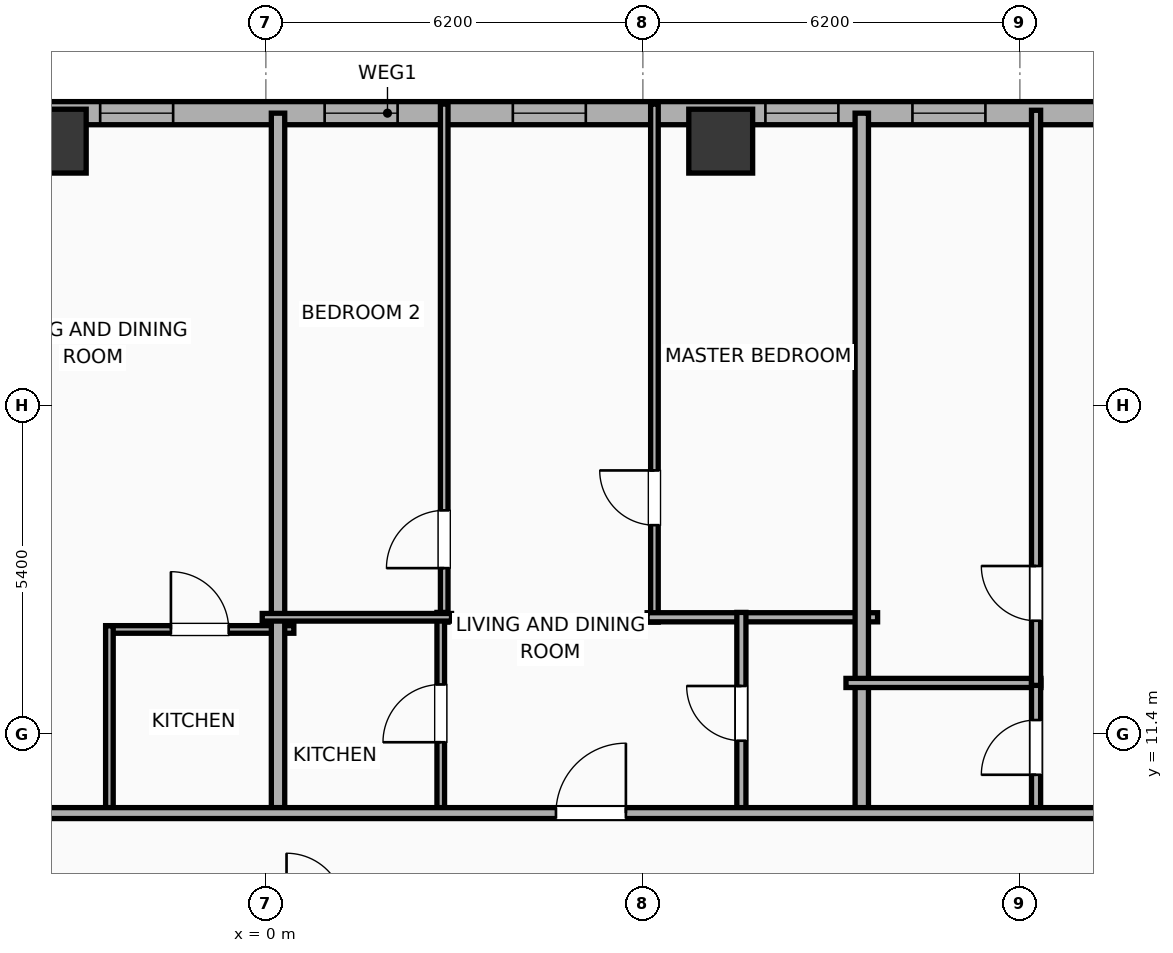
"""IFC4 building model, lengths in metres.
Left out: names, types, materials, properties, quantities, classifications, styles, units other than length and angle.
Written with IfcOpenShell. Run it as: python <this file> out.ifc"""

import sys

from ifc_helpers import new_model, si_unit, direction, frame, frame_2d, origin, origin_2d, place, context, subcontext, project, spatial, rectangle, hollow_rectangle, extrude, element, fill, save


model = new_model("IFC4")
c1 = context("Model", 3, precision=1e-05, world=origin(), true_north=direction((0.0, 1.0)))
c2 = subcontext(c1, "Body", "Model", "MODEL_VIEW")
j1 = project(units=[si_unit("LENGTHUNIT", "METRE"), si_unit("PLANEANGLEUNIT", "RADIAN")], contexts=[c1])
p1 = place(None, origin())
s1 = spatial("IfcSite", under=j1, at=p1, CompositionType="ELEMENT")
p2 = place(p1, origin())
s2 = spatial("IfcBuilding", under=s1, at=p2, CompositionType="ELEMENT")
p3 = place(p2, frame((0.0, 0.0, 97.5)))
s3 = spatial("IfcBuildingStorey", under=s2, at=p3, CompositionType="ELEMENT", Elevation=97.5)
for number, where, z_axis, x_axis in (
    (1, (7.48, 21.15, 0.0), (0.0, 0.0, 1.0), (1.0, 0.0, 0.0)),
    (2, (-3.48, 21.15, 0.0), (0.0, 0.0, 1.0), (1.0, 0.0, 0.0)),
):
    element("IfcColumn", number, at=place(p3, frame(where, z_axis=z_axis, x_axis=x_axis)), inside=s3, PredefinedType="COLUMN", context=c2, shape_type="SweptSolid", body=[
        extrude(hollow_rectangle(XDim=1.05, YDim=1.05, WallThickness=0.036, at=origin_2d()), origin(), (0.0, 0.0, 1.0), 3.9),
    ])
p4 = place(p3, frame((-25.381, 21.61, 0.0), z_axis=(0.0, 0.0, 1.0), x_axis=(1.0, 0.0, 0.0)))
e3 = element("IfcWall", 3, at=p4, inside=s3, PredefinedType="ELEMENTEDWALL", context=c2, shape_type="SweptSolid", body=[
    extrude(rectangle(XDim=54.763, YDim=0.38, at=frame_2d((27.381, 0.0))), origin(), (0.0, 0.0, 1.0), 3.65),
])
p5 = place(p4, frame((45.067, 0.0, 0.75)))
e4 = element("IfcOpeningElement", 4, at=p5, cuts=e3, PredefinedType="OPENING", context=c2, shape_type="SweptSolid", body=[
    extrude(rectangle(XDim=2.4, YDim=2.1, at=frame_2d((1.2, 1.05))), frame((0.0, 0.2, 0.0), z_axis=(0.0, -1.0, 0.0), x_axis=(1.0, 0.0, 0.0)), (0.0, 0.0, 1.0), 0.4),
])
p6 = place(p4, frame((4.076, 0.0, 0.75)))
e5 = element("IfcOpeningElement", 5, at=p6, cuts=e3, PredefinedType="OPENING", context=c2, shape_type="SweptSolid", body=[
    extrude(rectangle(XDim=1.2, YDim=2.05, at=frame_2d((0.6, 1.025))), frame((0.0, 0.2, 0.0), z_axis=(0.0, -1.0, 0.0), x_axis=(1.0, 0.0, 0.0)), (0.0, 0.0, 1.0), 0.4),
])
p7 = place(p4, frame((9.395, 0.0, 0.75)))
e6 = element("IfcOpeningElement", 6, at=p7, cuts=e3, PredefinedType="OPENING", context=c2, shape_type="SweptSolid", body=[
    extrude(rectangle(XDim=0.85, YDim=2.05, at=frame_2d((0.425, 1.025))), frame((0.0, 0.2, 0.0), z_axis=(0.0, -1.0, 0.0), x_axis=(1.0, 0.0, 0.0)), (0.0, 0.0, 1.0), 0.4),
])
p8 = place(p4, frame((7.205, 0.0, 0.75)))
e7 = element("IfcOpeningElement", 7, at=p8, cuts=e3, PredefinedType="OPENING", context=c2, shape_type="SweptSolid", body=[
    extrude(rectangle(XDim=1.2, YDim=2.05, at=frame_2d((0.6, 1.025))), frame((0.0, 0.2, 0.0), z_axis=(0.0, -1.0, 0.0), x_axis=(1.0, 0.0, 0.0)), (0.0, 0.0, 1.0), 0.4),
])
p9 = place(p4, frame((13.676, 0.0, 0.75)))
e8 = element("IfcOpeningElement", 8, at=p9, cuts=e3, PredefinedType="OPENING", context=c2, shape_type="SweptSolid", body=[
    extrude(rectangle(XDim=1.2, YDim=2.05, at=frame_2d((0.6, 1.025))), frame((0.0, 0.2, 0.0), z_axis=(0.0, -1.0, 0.0), x_axis=(1.0, 0.0, 0.0)), (0.0, 0.0, 1.0), 0.4),
])
p10 = place(p4, frame((17.136, 0.0, 0.75)))
e9 = element("IfcOpeningElement", 9, at=p10, cuts=e3, PredefinedType="OPENING", context=c2, shape_type="SweptSolid", body=[
    extrude(rectangle(XDim=1.2, YDim=2.05, at=frame_2d((0.6, 1.025))), frame((0.0, 0.2, 0.0), z_axis=(0.0, -1.0, 0.0), x_axis=(1.0, 0.0, 0.0)), (0.0, 0.0, 1.0), 0.4),
])
p11 = place(p4, frame((22.656, 0.0, 0.75)))
e10 = element("IfcOpeningElement", 10, at=p11, cuts=e3, PredefinedType="OPENING", context=c2, shape_type="SweptSolid", body=[
    extrude(rectangle(XDim=1.2, YDim=2.05, at=frame_2d((0.6, 1.025))), frame((0.0, 0.2, 0.0), z_axis=(0.0, -1.0, 0.0), x_axis=(1.0, 0.0, 0.0)), (0.0, 0.0, 1.0), 0.4),
])
p12 = place(p4, frame((29.443, 0.0, 0.75)))
e11 = element("IfcOpeningElement", 11, at=p12, cuts=e3, PredefinedType="OPENING", context=c2, shape_type="SweptSolid", body=[
    extrude(rectangle(XDim=1.2, YDim=2.05, at=frame_2d((0.6, 1.025))), frame((0.0, 0.2, 0.0), z_axis=(0.0, -1.0, 0.0), x_axis=(1.0, 0.0, 0.0)), (0.0, 0.0, 1.0), 0.4),
])
p13 = place(p4, frame((26.348, 0.0, 0.75)))
e12 = element("IfcOpeningElement", 12, at=p13, cuts=e3, PredefinedType="OPENING", context=c2, shape_type="SweptSolid", body=[
    extrude(rectangle(XDim=1.2, YDim=2.05, at=frame_2d((0.6, 1.025))), frame((0.0, 0.2, 0.0), z_axis=(0.0, -1.0, 0.0), x_axis=(1.0, 0.0, 0.0)), (0.0, 0.0, 1.0), 0.4),
])
p14 = place(p4, frame((33.596, 0.0, 0.75)))
e13 = element("IfcOpeningElement", 13, at=p14, cuts=e3, PredefinedType="OPENING", context=c2, shape_type="SweptSolid", body=[
    extrude(rectangle(XDim=1.2, YDim=2.05, at=frame_2d((0.6, 1.025))), frame((0.0, 0.2, 0.0), z_axis=(0.0, -1.0, 0.0), x_axis=(1.0, 0.0, 0.0)), (0.0, 0.0, 1.0), 0.4),
])
p15 = place(p4, frame((36.014, 0.0, 0.75)))
e14 = element("IfcOpeningElement", 14, at=p15, cuts=e3, PredefinedType="OPENING", context=c2, shape_type="SweptSolid", body=[
    extrude(rectangle(XDim=1.2, YDim=2.05, at=frame_2d((0.6, 1.025))), frame((0.0, 0.2, 0.0), z_axis=(0.0, -1.0, 0.0), x_axis=(1.0, 0.0, 0.0)), (0.0, 0.0, 1.0), 0.4),
])
p16 = place(p4, frame((40.814, 0.0, 0.75)))
e15 = element("IfcOpeningElement", 15, at=p16, cuts=e3, PredefinedType="OPENING", context=c2, shape_type="SweptSolid", body=[
    extrude(rectangle(XDim=1.2, YDim=2.05, at=frame_2d((0.6, 1.025))), frame((0.0, 0.2, 0.0), z_axis=(0.0, -1.0, 0.0), x_axis=(1.0, 0.0, 0.0)), (0.0, 0.0, 1.0), 0.4),
])
p17 = place(p4, frame((49.385, 0.0, 0.75)))
e16 = element("IfcOpeningElement", 16, at=p17, cuts=e3, PredefinedType="OPENING", context=c2, shape_type="SweptSolid", body=[
    extrude(rectangle(XDim=1.2, YDim=2.05, at=frame_2d((0.6, 1.025))), frame((0.0, 0.2, 0.0), z_axis=(0.0, -1.0, 0.0), x_axis=(1.0, 0.0, 0.0)), (0.0, 0.0, 1.0), 0.4),
])
p18 = place(p4, frame((52.181, 0.0, 0.75)))
e17 = element("IfcOpeningElement", 17, at=p18, cuts=e3, PredefinedType="OPENING", context=c2, shape_type="SweptSolid", body=[
    extrude(rectangle(XDim=1.2, YDim=2.05, at=frame_2d((0.6, 1.025))), frame((0.0, 0.2, 0.0), z_axis=(0.0, -1.0, 0.0), x_axis=(1.0, 0.0, 0.0)), (0.0, 0.0, 1.0), 0.4),
])
p19 = place(p3, frame((-2.633, 13.12, 0.0), z_axis=(0.0, 0.0, 1.0), x_axis=(1.0, 0.0, 0.0)))
e18 = element("IfcWall", 18, at=p19, inside=s3, PredefinedType="PARTITIONING", context=c2, shape_type="SweptSolid", body=[
    extrude(rectangle(XDim=3.093, YDim=0.125, at=frame_2d((1.546, 0.0))), origin(), (0.0, 0.0, 1.0), 3.65),
])
p20 = place(p19, frame((1.072, 0.0, 0.0)))
e19 = element("IfcOpeningElement", 19, at=p20, cuts=e18, PredefinedType="OPENING", context=c2, shape_type="SweptSolid", body=[
    extrude(rectangle(XDim=0.95, YDim=2.05, at=frame_2d((0.475, 1.025))), frame((0.0, 0.073, 0.0), z_axis=(0.0, -1.0, 0.0), x_axis=(1.0, 0.0, 0.0)), (0.0, 0.0, 1.0), 0.145),
])
p21 = place(p3, frame((-2.573, 10.08, 0.0), z_axis=(0.0, 0.0, 1.0), x_axis=(0.0, 1.0, 0.0)))
e20 = element("IfcWall", 20, at=p21, inside=s3, PredefinedType="PARTITIONING", context=c2, shape_type="SweptSolid", body=[
    extrude(rectangle(XDim=3.1, YDim=0.125, at=frame_2d((1.55, 0.0))), origin(), (0.0, 0.0, 1.0), 3.65),
])
p22 = place(p3, frame((0.2, 10.02, 0.0), z_axis=(0.0, 0.0, 1.0), x_axis=(0.0, 1.0, 0.0)))
e21 = element("IfcWall", 21, at=p22, inside=s3, PredefinedType="PARTITIONING", context=c2, shape_type="SweptSolid", body=[
    extrude(rectangle(XDim=11.59, YDim=0.22, at=frame_2d((5.795, 0.0))), origin(), (0.0, 0.0, 1.0), 3.65),
])
p23 = place(p3, frame((2.933, 13.24, 0.0), z_axis=(0.0, 0.0, 1.0), x_axis=(0.0, 1.0, 0.0)))
e22 = element("IfcWall", 22, at=p23, inside=s3, PredefinedType="PARTITIONING", context=c2, shape_type="SweptSolid", body=[
    extrude(rectangle(XDim=8.52, YDim=0.125, at=frame_2d((4.26, 0.0))), origin(), (0.0, 0.0, 1.0), 3.65),
])
p24 = place(p23, frame((0.888, 0.0, 0.0)))
e23 = element("IfcOpeningElement", 23, at=p24, cuts=e22, PredefinedType="OPENING", context=c2, shape_type="SweptSolid", body=[
    extrude(rectangle(XDim=0.95, YDim=2.05, at=frame_2d((0.475, 1.025))), frame((0.0, 0.073, 0.0), z_axis=(0.0, -1.0, 0.0), x_axis=(1.0, 0.0, 0.0)), (0.0, 0.0, 1.0), 0.145),
])
p25 = place(p3, frame((6.39, 13.24, 0.0), z_axis=(0.0, 0.0, 1.0), x_axis=(0.0, 1.0, 0.0)))
e24 = element("IfcWall", 24, at=p25, inside=s3, PredefinedType="PARTITIONING", context=c2, shape_type="SweptSolid", body=[
    extrude(rectangle(XDim=8.52, YDim=0.125, at=frame_2d((4.26, 0.0))), origin(), (0.0, 0.0, 1.0), 3.04),
])
p26 = place(p25, frame((1.595, 0.0, 0.0)))
e25 = element("IfcOpeningElement", 25, at=p26, cuts=e24, PredefinedType="OPENING", context=c2, shape_type="SweptSolid", body=[
    extrude(rectangle(XDim=0.9, YDim=2.05, at=frame_2d((0.45, 1.025))), frame((0.0, 0.073, 0.0), z_axis=(0.0, -1.0, 0.0), x_axis=(1.0, 0.0, 0.0)), (0.0, 0.0, 1.0), 0.145),
])
p27 = place(p3, frame((6.27, 13.32, 0.0), z_axis=(0.0, 0.0, 1.0), x_axis=(1.0, 0.0, 0.0)))
e26 = element("IfcWall", 26, at=p27, inside=s3, PredefinedType="PLUMBINGWALL", context=c2, shape_type="SweptSolid", body=[
    extrude(rectangle(XDim=3.79, YDim=0.15, at=frame_2d((1.895, 0.0))), origin(), (0.0, 0.0, 1.0), 3.65),
])
p28 = place(p3, frame((2.876, 10.08, 0.0), z_axis=(0.0, 0.0, 1.0), x_axis=(0.0, 1.0, 0.0)))
e27 = element("IfcWall", 27, at=p28, inside=s3, PredefinedType="PARTITIONING", context=c2, shape_type="SweptSolid", body=[
    extrude(rectangle(XDim=3.32, YDim=0.125, at=frame_2d((1.66, 0.0))), origin(), (0.0, 0.0, 1.0), 3.65),
])
p29 = place(p28, frame((1.185, 0.0, 0.0)))
e28 = element("IfcOpeningElement", 28, at=p29, cuts=e27, PredefinedType="OPENING", context=c2, shape_type="SweptSolid", body=[
    extrude(rectangle(XDim=0.95, YDim=2.05, at=frame_2d((0.475, 1.025))), frame((0.0, 0.073, 0.0), z_axis=(0.0, -1.0, 0.0), x_axis=(1.0, 0.0, 0.0)), (0.0, 0.0, 1.0), 0.145),
])
p30 = place(p3, frame((-0.06, 13.32, 0.0), z_axis=(0.0, 0.0, 1.0), x_axis=(1.0, 0.0, 0.0)))
e29 = element("IfcWall", 29, at=p30, inside=s3, PredefinedType="PARTITIONING", context=c2, shape_type="SweptSolid", body=[
    extrude(rectangle(XDim=3.113, YDim=0.125, at=frame_2d((1.557, 0.0))), origin(), (0.0, 0.0, 1.0), 3.65),
])
p31 = place(p3, frame((7.82, 10.08, 0.0), z_axis=(0.0, 0.0, 1.0), x_axis=(0.0, 1.0, 0.0)))
e30 = element("IfcWall", 30, at=p31, inside=s3, PredefinedType="PLUMBINGWALL", context=c2, shape_type="SweptSolid", body=[
    extrude(rectangle(XDim=3.32, YDim=0.15, at=frame_2d((1.66, 0.0))), origin(), (0.0, 0.0, 1.0), 3.65),
])
p32 = place(p31, frame((1.21, 0.0, 0.0)))
e31 = element("IfcOpeningElement", 31, at=p32, cuts=e30, PredefinedType="OPENING", context=c2, shape_type="SweptSolid", body=[
    extrude(rectangle(XDim=0.9, YDim=2.05, at=frame_2d((0.45, 1.025))), frame((0.0, 0.085, 0.0), z_axis=(0.0, -1.0, 0.0), x_axis=(1.0, 0.0, 0.0)), (0.0, 0.0, 1.0), 0.17),
])
p33 = place(p3, frame((9.8, 10.02, 0.0), z_axis=(0.0, 0.0, 1.0), x_axis=(0.0, 1.0, 0.0)))
e32 = element("IfcWall", 32, at=p33, inside=s3, PredefinedType="PARTITIONING", context=c2, shape_type="SweptSolid", body=[
    extrude(rectangle(XDim=11.59, YDim=0.22, at=frame_2d((5.795, 0.0))), origin(), (0.0, 0.0, 1.0), 3.65),
])
p34 = place(p3, frame((9.54, 12.24, 0.0), z_axis=(0.0, 0.0, 1.0), x_axis=(1.0, 0.0, 0.0)))
e33 = element("IfcWall", 33, at=p34, inside=s3, PredefinedType="PLUMBINGWALL", context=c2, shape_type="SweptSolid", body=[
    extrude(rectangle(XDim=3.206, YDim=0.15, at=frame_2d((1.603, 0.0))), origin(), (0.0, 0.0, 1.0), 3.65),
])
p35 = place(p3, frame((12.666, 10.08, 0.0), z_axis=(0.0, 0.0, 1.0), x_axis=(0.0, 1.0, 0.0)))
e34 = element("IfcWall", 34, at=p35, inside=s3, PredefinedType="PLUMBINGWALL", context=c2, shape_type="SweptSolid", body=[
    extrude(rectangle(XDim=2.2, YDim=0.15, at=frame_2d((1.1, 0.0))), origin(), (0.0, 0.0, 1.0), 3.65),
])
p36 = place(p35, frame((0.65, 0.0, 0.0)))
e35 = element("IfcOpeningElement", 35, at=p36, cuts=e34, PredefinedType="OPENING", context=c2, shape_type="SweptSolid", body=[
    extrude(rectangle(XDim=0.9, YDim=2.05, at=frame_2d((0.45, 1.025))), frame((0.0, 0.085, 0.0), z_axis=(0.0, -1.0, 0.0), x_axis=(1.0, 0.0, 0.0)), (0.0, 0.0, 1.0), 0.17),
])
p37 = place(p3, frame((12.666, 12.2, 0.0), z_axis=(0.0, 0.0, 1.0), x_axis=(0.0, 1.0, 0.0)))
e36 = element("IfcWall", 36, at=p37, inside=s3, PredefinedType="PLUMBINGWALL", context=c2, shape_type="SweptSolid", body=[
    extrude(rectangle(XDim=9.458, YDim=0.15, at=frame_2d((4.729, 0.0))), origin(), (0.0, 0.0, 1.0), 3.65),
])
p38 = place(p37, frame((1.063, 0.0, 0.0)))
e37 = element("IfcOpeningElement", 37, at=p38, cuts=e36, PredefinedType="OPENING", context=c2, shape_type="SweptSolid", body=[
    extrude(rectangle(XDim=0.9, YDim=2.05, at=frame_2d((0.45, 1.025))), frame((0.0, 0.085, 0.0), z_axis=(0.0, -1.0, 0.0), x_axis=(1.0, 0.0, 0.0)), (0.0, 0.0, 1.0), 0.17),
])
p39 = place(p3, frame((-29.21, 10.1, 0.0), z_axis=(0.0, 0.0, 1.0), x_axis=(1.0, 0.0, 0.0)))
e38 = element("IfcWall", 38, at=p39, inside=s3, PredefinedType="PARTITIONING", context=c2, shape_type="SweptSolid", body=[
    extrude(rectangle(XDim=62.42, YDim=0.18, at=frame_2d((31.21, 0.0))), origin(), (0.0, 0.0, 1.0), 3.65),
])
p40 = place(p39, frame((4.906, 0.0, 0.0)))
e39 = element("IfcOpeningElement", 39, at=p40, cuts=e38, PredefinedType="OPENING", context=c2, shape_type="SweptSolid", body=[
    extrude(rectangle(XDim=1.15, YDim=2.05, at=frame_2d((0.575, 1.025))), frame((0.0, 0.1, 0.0), z_axis=(0.0, -1.0, 0.0), x_axis=(1.0, 0.0, 0.0)), (0.0, 0.0, 1.0), 0.2),
])
p41 = place(p39, frame((14.812, 0.0, 0.0)))
e40 = element("IfcOpeningElement", 40, at=p41, cuts=e38, PredefinedType="OPENING", context=c2, shape_type="SweptSolid", body=[
    extrude(rectangle(XDim=1.15, YDim=2.05, at=frame_2d((0.575, 1.025))), frame((0.0, 0.1, 0.0), z_axis=(0.0, -1.0, 0.0), x_axis=(1.0, 0.0, 0.0)), (0.0, 0.0, 1.0), 0.2),
])
p42 = place(p39, frame((24.406, 0.0, 0.0)))
e41 = element("IfcOpeningElement", 41, at=p42, cuts=e38, PredefinedType="OPENING", context=c2, shape_type="SweptSolid", body=[
    extrude(rectangle(XDim=1.15, YDim=2.05, at=frame_2d((0.575, 1.025))), frame((0.0, 0.1, 0.0), z_axis=(0.0, -1.0, 0.0), x_axis=(1.0, 0.0, 0.0)), (0.0, 0.0, 1.0), 0.2),
])
p43 = place(p39, frame((33.981, 0.0, 0.0)))
e42 = element("IfcOpeningElement", 42, at=p43, cuts=e38, PredefinedType="OPENING", context=c2, shape_type="SweptSolid", body=[
    extrude(rectangle(XDim=1.15, YDim=2.05, at=frame_2d((0.575, 1.025))), frame((0.0, 0.1, 0.0), z_axis=(0.0, -1.0, 0.0), x_axis=(1.0, 0.0, 0.0)), (0.0, 0.0, 1.0), 0.2),
])
p44 = place(p39, frame((43.138, 0.0, 0.0)))
e43 = element("IfcOpeningElement", 43, at=p44, cuts=e38, PredefinedType="OPENING", context=c2, shape_type="SweptSolid", body=[
    extrude(rectangle(XDim=1.15, YDim=2.05, at=frame_2d((0.575, 1.025))), frame((0.0, 0.1, 0.0), z_axis=(0.0, -1.0, 0.0), x_axis=(1.0, 0.0, 0.0)), (0.0, 0.0, 1.0), 0.2),
])
p45 = place(p39, frame((51.777, 0.0, 0.0)))
e44 = element("IfcOpeningElement", 44, at=p45, cuts=e38, PredefinedType="OPENING", context=c2, shape_type="SweptSolid", body=[
    extrude(rectangle(XDim=0.9, YDim=2.05, at=frame_2d((0.45, 1.025))), frame((0.0, 0.1, 0.0), z_axis=(0.0, -1.0, 0.0), x_axis=(1.0, 0.0, 0.0)), (0.0, 0.0, 1.0), 0.2),
])
p46 = place(p39, frame((58.718, 0.0, 0.0)))
e45 = element("IfcOpeningElement", 45, at=p46, cuts=e38, PredefinedType="OPENING", context=c2, shape_type="SweptSolid", body=[
    extrude(rectangle(XDim=0.9, YDim=2.05, at=frame_2d((0.45, 1.025))), frame((0.0, 0.1, 0.0), z_axis=(0.0, -1.0, 0.0), x_axis=(1.0, 0.0, 0.0)), (0.0, 0.0, 1.0), 0.2),
])
p47 = place(p11, origin())
e46 = element("IfcWindow", 46, at=p47, inside=s3, PartitioningType="SINGLE_PANEL", PredefinedType="WINDOW", context=c2, shape_type="SweptSolid", body=[
    extrude(rectangle(XDim=1.2, YDim=2.05, at=frame_2d((0.6, 1.025))), frame((0.0, 0.03, 0.0), z_axis=(0.0, -1.0, 0.0), x_axis=(1.0, 0.0, 0.0)), (0.0, 0.0, 1.0), 0.06),
])
fill(e10, e46)
p48 = place(p12, origin())
e47 = element("IfcWindow", 47, at=p48, inside=s3, PartitioningType="SINGLE_PANEL", PredefinedType="WINDOW", context=c2, shape_type="SweptSolid", body=[
    extrude(rectangle(XDim=1.2, YDim=2.05, at=frame_2d((0.6, 1.025))), frame((0.0, 0.03, 0.0), z_axis=(0.0, -1.0, 0.0), x_axis=(1.0, 0.0, 0.0)), (0.0, 0.0, 1.0), 0.06),
])
fill(e11, e47)
p49 = place(p13, origin())
e48 = element("IfcWindow", 48, at=p49, inside=s3, PartitioningType="SINGLE_PANEL", PredefinedType="WINDOW", context=c2, shape_type="SweptSolid", body=[
    extrude(rectangle(XDim=1.2, YDim=2.05, at=frame_2d((0.6, 1.025))), frame((0.0, 0.03, 0.0), z_axis=(0.0, -1.0, 0.0), x_axis=(1.0, 0.0, 0.0)), (0.0, 0.0, 1.0), 0.06),
])
fill(e12, e48)
p50 = place(p14, origin())
e49 = element("IfcWindow", 49, at=p50, inside=s3, PartitioningType="SINGLE_PANEL", PredefinedType="WINDOW", context=c2, shape_type="SweptSolid", body=[
    extrude(rectangle(XDim=1.2, YDim=2.05, at=frame_2d((0.6, 1.025))), frame((0.0, 0.03, 0.0), z_axis=(0.0, -1.0, 0.0), x_axis=(1.0, 0.0, 0.0)), (0.0, 0.0, 1.0), 0.06),
])
fill(e13, e49)
p51 = place(p15, origin())
e50 = element("IfcWindow", 50, at=p51, inside=s3, PartitioningType="SINGLE_PANEL", PredefinedType="WINDOW", context=c2, shape_type="SweptSolid", body=[
    extrude(rectangle(XDim=1.2, YDim=2.05, at=frame_2d((0.6, 1.025))), frame((0.0, 0.03, 0.0), z_axis=(0.0, -1.0, 0.0), x_axis=(1.0, 0.0, 0.0)), (0.0, 0.0, 1.0), 0.06),
])
fill(e14, e50)
p52 = place(p20, origin())
e51 = element("IfcDoor", 51, at=p52, inside=s3, OperationType="SINGLE_SWING_LEFT", PredefinedType="DOOR", context=c2, shape_type="SweptSolid", body=[
    extrude(rectangle(XDim=0.95, YDim=2.05, at=frame_2d((0.475, 1.025))), frame((0.0, 0.025, 0.0), z_axis=(0.0, -1.0, 0.0), x_axis=(1.0, 0.0, 0.0)), (0.0, 0.0, 1.0), 0.05),
])
fill(e19, e51)
p53 = place(p24, origin())
e52 = element("IfcDoor", 52, at=p53, inside=s3, OperationType="SINGLE_SWING_LEFT", PredefinedType="DOOR", context=c2, shape_type="SweptSolid", body=[
    extrude(rectangle(XDim=0.95, YDim=2.05, at=frame_2d((0.475, 1.025))), frame((0.0, 0.025, 0.0), z_axis=(0.0, -1.0, 0.0), x_axis=(1.0, 0.0, 0.0)), (0.0, 0.0, 1.0), 0.05),
])
fill(e23, e52)
p54 = place(p26, origin())
e53 = element("IfcDoor", 53, at=p54, inside=s3, OperationType="SINGLE_SWING_RIGHT", PredefinedType="DOOR", context=c2, shape_type="SweptSolid", body=[
    extrude(rectangle(XDim=0.9, YDim=2.05, at=frame_2d((0.45, 1.025))), frame((0.0, 0.025, 0.0), z_axis=(0.0, -1.0, 0.0), x_axis=(1.0, 0.0, 0.0)), (0.0, 0.0, 1.0), 0.05),
])
fill(e25, e53)
p55 = place(p29, origin())
e54 = element("IfcDoor", 54, at=p55, inside=s3, OperationType="SINGLE_SWING_LEFT", PredefinedType="DOOR", context=c2, shape_type="SweptSolid", body=[
    extrude(rectangle(XDim=0.95, YDim=2.05, at=frame_2d((0.475, 1.025))), frame((0.0, 0.025, 0.0), z_axis=(0.0, -1.0, 0.0), x_axis=(1.0, 0.0, 0.0)), (0.0, 0.0, 1.0), 0.05),
])
fill(e28, e54)
p56 = place(p32, origin())
e55 = element("IfcDoor", 55, at=p56, inside=s3, OperationType="SINGLE_SWING_RIGHT", PredefinedType="DOOR", context=c2, shape_type="SweptSolid", body=[
    extrude(rectangle(XDim=0.9, YDim=2.05, at=frame_2d((0.45, 1.025))), frame((0.0, 0.025, 0.0), z_axis=(0.0, -1.0, 0.0), x_axis=(1.0, 0.0, 0.0)), (0.0, 0.0, 1.0), 0.05),
])
fill(e31, e55)
p57 = place(p36, origin())
e56 = element("IfcDoor", 56, at=p57, inside=s3, OperationType="SINGLE_SWING_LEFT", PredefinedType="DOOR", context=c2, shape_type="SweptSolid", body=[
    extrude(rectangle(XDim=0.9, YDim=2.05, at=frame_2d((0.45, 1.025))), frame((0.0, 0.025, 0.0), z_axis=(0.0, -1.0, 0.0), x_axis=(1.0, 0.0, 0.0)), (0.0, 0.0, 1.0), 0.05),
])
fill(e35, e56)
p58 = place(p38, origin())
e57 = element("IfcDoor", 57, at=p58, inside=s3, OperationType="SINGLE_SWING_RIGHT", PredefinedType="DOOR", context=c2, shape_type="SweptSolid", body=[
    extrude(rectangle(XDim=0.9, YDim=2.05, at=frame_2d((0.45, 1.025))), frame((0.0, 0.025, 0.0), z_axis=(0.0, -1.0, 0.0), x_axis=(1.0, 0.0, 0.0)), (0.0, 0.0, 1.0), 0.05),
])
fill(e37, e57)
p59 = place(p43, origin())
e58 = element("IfcDoor", 58, at=p59, inside=s3, OperationType="SINGLE_SWING_RIGHT", PredefinedType="DOOR", context=c2, shape_type="SweptSolid", body=[
    extrude(rectangle(XDim=1.15, YDim=2.05, at=frame_2d((0.575, 1.025))), frame((0.0, 0.025, 0.0), z_axis=(0.0, -1.0, 0.0), x_axis=(1.0, 0.0, 0.0)), (0.0, 0.0, 1.0), 0.05),
])
fill(e42, e58)
save(model, sys.argv[1])
